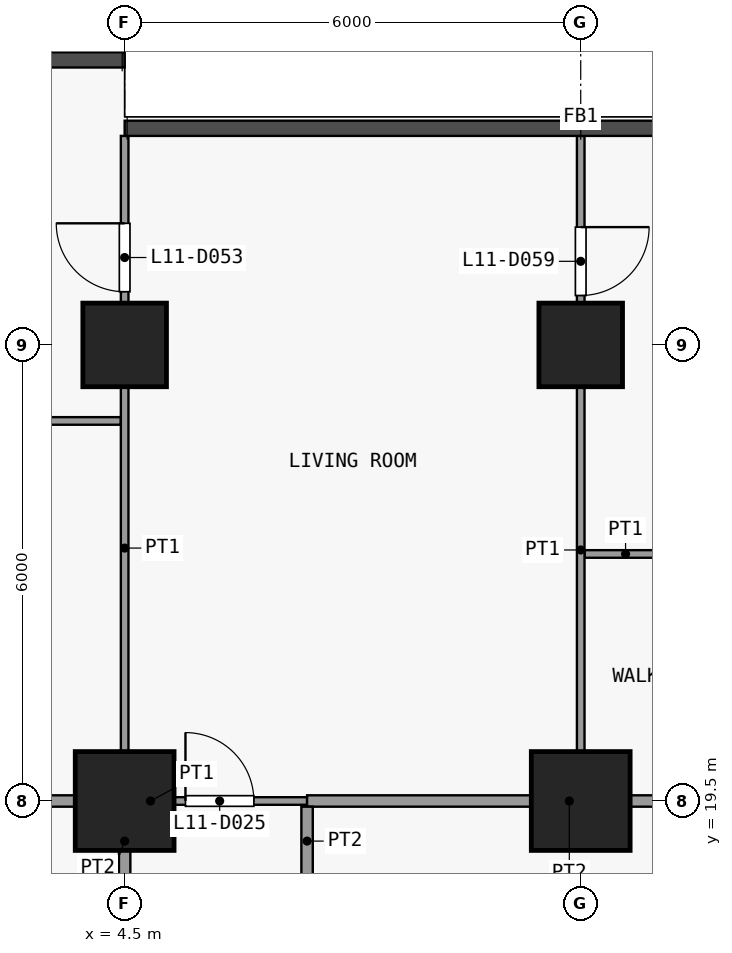
"""IFC4 building model, lengths in metres.
Left out: names, types, materials, properties, quantities, classifications, styles, units other than length and angle.
Written with IfcOpenShell. Run it as: python <this file> out.ifc"""

import sys

from ifc_helpers import new_model, si_unit, direction, frame, frame_2d, origin, origin_2d, place, context, subcontext, project, spatial, rectangle, extrude, element, fill, save


model = new_model("IFC4")
c1 = context("Model", 3, precision=1e-05, world=origin(), true_north=direction((0.0, 1.0)))
c2 = subcontext(c1, "Body", "Model", "MODEL_VIEW")
j1 = project(units=[si_unit("LENGTHUNIT", "METRE"), si_unit("PLANEANGLEUNIT", "RADIAN")], contexts=[c1])
p1 = place(None, origin())
s1 = spatial("IfcSite", under=j1, at=p1, CompositionType="ELEMENT")
p2 = place(p1, origin())
s2 = spatial("IfcBuilding", under=s1, at=p2, CompositionType="ELEMENT")
p3 = place(p2, frame((0.0, 0.0, 50.5)))
s3 = spatial("IfcBuildingStorey", under=s2, at=p3, CompositionType="ELEMENT", Elevation=50.5)
p4 = place(p3, frame((4.5, 19.5, 0.0), z_axis=(0.0, 0.0, 1.0), x_axis=(1.0, 0.0, 0.0)))
e1 = element("IfcColumn", 1, at=p4, inside=s3, PredefinedType="COLUMN", context=c2, shape_type="SweptSolid", body=[
    extrude(rectangle(XDim=1.3, YDim=1.3, at=origin_2d()), origin(), (0.0, 0.0, 1.0), 3.6),
])
p5 = place(p3, frame((4.5, 25.5, 0.0), z_axis=(0.0, 0.0, 1.0), x_axis=(1.0, 0.0, 0.0)))
e2 = element("IfcColumn", 2, at=p5, inside=s3, PredefinedType="COLUMN", context=c2, shape_type="SweptSolid", body=[
    extrude(rectangle(XDim=1.1, YDim=1.1, at=origin_2d()), origin(), (0.0, 0.0, 1.0), 3.6),
])
p6 = place(p3, frame((10.5, 19.5, 0.0), z_axis=(0.0, 0.0, 1.0), x_axis=(1.0, 0.0, 0.0)))
e3 = element("IfcColumn", 3, at=p6, inside=s3, PredefinedType="COLUMN", context=c2, shape_type="SweptSolid", body=[
    extrude(rectangle(XDim=1.3, YDim=1.3, at=origin_2d()), origin(), (0.0, 0.0, 1.0), 3.6),
])
p7 = place(p3, frame((10.5, 25.5, 0.0), z_axis=(0.0, 0.0, 1.0), x_axis=(1.0, 0.0, 0.0)))
e4 = element("IfcColumn", 4, at=p7, inside=s3, PredefinedType="COLUMN", context=c2, shape_type="SweptSolid", body=[
    extrude(rectangle(XDim=1.1, YDim=1.1, at=origin_2d()), origin(), (0.0, 0.0, 1.0), 3.6),
])
p8 = place(p3, frame((4.5, 19.5, 0.0), z_axis=(0.0, 0.0, 1.0), x_axis=(1.0, 0.0, 0.0)))
e5 = element("IfcWall", 5, at=p8, inside=s3, PredefinedType="PARTITIONING", context=c2, shape_type="SweptSolid", body=[
    extrude(rectangle(XDim=2.4, YDim=0.1, at=frame_2d((1.2, 0.0))), origin(), (0.0, 0.0, 1.0), 3.3),
])
p9 = place(p8, frame((0.8, 0.0, 0.0)))
e6 = element("IfcOpeningElement", 6, at=p9, cuts=e5, PredefinedType="OPENING", context=c2, shape_type="SweptSolid", body=[
    extrude(rectangle(XDim=0.9, YDim=2.1, at=frame_2d((0.45, 1.05))), frame((0.0, 0.06, 0.0), z_axis=(0.0, -1.0, 0.0), x_axis=(1.0, 0.0, 0.0)), (0.0, 0.0, 1.0), 0.12),
])
p10 = place(p3, frame((-2.75, 19.5, 0.0), z_axis=(0.0, 0.0, 1.0), x_axis=(1.0, 0.0, 0.0)))
e7 = element("IfcWall", 7, at=p10, inside=s3, PredefinedType="PARTITIONING", context=c2, shape_type="SweptSolid", body=[
    extrude(rectangle(XDim=7.25, YDim=0.15, at=frame_2d((3.625, 0.0))), origin(), (0.0, 0.0, 1.0), 3.3),
])
p11 = place(p3, frame((6.9, 19.5, 0.0), z_axis=(0.0, 0.0, 1.0), x_axis=(1.0, 0.0, 0.0)))
e8 = element("IfcWall", 8, at=p11, inside=s3, PredefinedType="PARTITIONING", context=c2, shape_type="SweptSolid", body=[
    extrude(rectangle(XDim=6.9, YDim=0.15, at=frame_2d((3.45, 0.0))), origin(), (0.0, 0.0, 1.0), 3.3),
])
p12 = place(p3, frame((10.55, 22.75, 0.0), z_axis=(0.0, 0.0, 1.0), x_axis=(1.0, 0.0, 0.0)))
e9 = element("IfcWall", 9, at=p12, inside=s3, PredefinedType="PARTITIONING", context=c2, shape_type="SweptSolid", body=[
    extrude(rectangle(XDim=3.25, YDim=0.1, at=frame_2d((1.625, 0.0))), origin(), (0.0, 0.0, 1.0), 3.3),
])
p13 = place(p12, frame((1.2, 0.0, 0.0)))
e10 = element("IfcOpeningElement", 10, at=p13, cuts=e9, PredefinedType="OPENING", context=c2, shape_type="SweptSolid", body=[
    extrude(rectangle(XDim=0.9, YDim=2.1, at=frame_2d((0.45, 1.05))), frame((0.0, 0.06, 0.0), z_axis=(0.0, -1.0, 0.0), x_axis=(1.0, 0.0, 0.0)), (0.0, 0.0, 1.0), 0.12),
])
p14 = place(p3, frame((-4.4, 24.5, 0.0), z_axis=(0.0, 0.0, 1.0), x_axis=(1.0, 0.0, 0.0)))
e11 = element("IfcWall", 11, at=p14, inside=s3, PredefinedType="PARTITIONING", context=c2, shape_type="SweptSolid", body=[
    extrude(rectangle(XDim=8.85, YDim=0.1, at=frame_2d((4.425, 0.0))), origin(), (0.0, 0.0, 1.0), 3.3),
])
p15 = place(p14, frame((4.0, 0.0, 0.0)))
e12 = element("IfcOpeningElement", 12, at=p15, cuts=e11, PredefinedType="OPENING", context=c2, shape_type="SweptSolid", body=[
    extrude(rectangle(XDim=0.9, YDim=2.1, at=frame_2d((0.45, 1.05))), frame((0.0, 0.06, 0.0), z_axis=(0.0, -1.0, 0.0), x_axis=(1.0, 0.0, 0.0)), (0.0, 0.0, 1.0), 0.12),
])
p16 = place(p3, frame((4.5, 19.575, 0.0), z_axis=(0.0, 0.0, 1.0), x_axis=(0.0, 1.0, 0.0)))
e13 = element("IfcWall", 13, at=p16, inside=s3, PredefinedType="PARTITIONING", context=c2, shape_type="SweptSolid", body=[
    extrude(rectangle(XDim=8.675, YDim=0.1, at=frame_2d((4.337, 0.0))), origin(), (0.0, 0.0, 1.0), 3.3),
])
p17 = place(p16, frame((6.625, 0.0, 0.0)))
e14 = element("IfcOpeningElement", 14, at=p17, cuts=e13, PredefinedType="OPENING", context=c2, shape_type="SweptSolid", body=[
    extrude(rectangle(XDim=0.9, YDim=2.1, at=frame_2d((0.45, 1.05))), frame((0.0, 0.06, 0.0), z_axis=(0.0, -1.0, 0.0), x_axis=(1.0, 0.0, 0.0)), (0.0, 0.0, 1.0), 0.12),
])
p18 = place(p3, frame((4.5, 16.6, 0.0), z_axis=(0.0, 0.0, 1.0), x_axis=(0.0, 1.0, 0.0)))
e15 = element("IfcWall", 15, at=p18, inside=s3, PredefinedType="PARTITIONING", context=c2, shape_type="SweptSolid", body=[
    extrude(rectangle(XDim=2.825, YDim=0.15, at=frame_2d((1.413, 0.0))), origin(), (0.0, 0.0, 1.0), 3.3),
])
p19 = place(p18, frame((0.9, 0.0, 0.0)))
e16 = element("IfcOpeningElement", 16, at=p19, cuts=e15, PredefinedType="OPENING", context=c2, shape_type="SweptSolid", body=[
    extrude(rectangle(XDim=0.9, YDim=2.1, at=frame_2d((0.45, 1.05))), frame((0.0, 0.085, 0.0), z_axis=(0.0, -1.0, 0.0), x_axis=(1.0, 0.0, 0.0)), (0.0, 0.0, 1.0), 0.17),
])
p20 = place(p3, frame((6.9, 16.6, 0.0), z_axis=(0.0, 0.0, 1.0), x_axis=(0.0, 1.0, 0.0)))
e17 = element("IfcWall", 17, at=p20, inside=s3, PredefinedType="PARTITIONING", context=c2, shape_type="SweptSolid", body=[
    extrude(rectangle(XDim=2.825, YDim=0.15, at=frame_2d((1.413, 0.0))), origin(), (0.0, 0.0, 1.0), 3.3),
])
p21 = place(p20, frame((0.9, 0.0, 0.0)))
e18 = element("IfcOpeningElement", 18, at=p21, cuts=e17, PredefinedType="OPENING", context=c2, shape_type="SweptSolid", body=[
    extrude(rectangle(XDim=0.9, YDim=2.1, at=frame_2d((0.45, 1.05))), frame((0.0, 0.085, 0.0), z_axis=(0.0, -1.0, 0.0), x_axis=(1.0, 0.0, 0.0)), (0.0, 0.0, 1.0), 0.17),
])
p22 = place(p3, frame((10.5, 19.575, 0.0), z_axis=(0.0, 0.0, 1.0), x_axis=(0.0, 1.0, 0.0)))
e19 = element("IfcWall", 19, at=p22, inside=s3, PredefinedType="PARTITIONING", context=c2, shape_type="SweptSolid", body=[
    extrude(rectangle(XDim=8.675, YDim=0.1, at=frame_2d((4.337, 0.0))), origin(), (0.0, 0.0, 1.0), 3.3),
])
p23 = place(p22, frame((6.575, 0.0, 0.0)))
e20 = element("IfcOpeningElement", 20, at=p23, cuts=e19, PredefinedType="OPENING", context=c2, shape_type="SweptSolid", body=[
    extrude(rectangle(XDim=0.9, YDim=2.1, at=frame_2d((0.45, 1.05))), frame((0.0, 0.06, 0.0), z_axis=(0.0, -1.0, 0.0), x_axis=(1.0, 0.0, 0.0)), (0.0, 0.0, 1.0), 0.12),
])
p24 = place(p9, origin())
e21 = element("IfcDoor", 21, at=p24, inside=s3, OperationType="SINGLE_SWING_RIGHT", PredefinedType="DOOR", context=c2, shape_type="SweptSolid", body=[
    extrude(rectangle(XDim=0.9, YDim=2.1, at=frame_2d((0.45, 1.05))), frame((0.0, 0.025, 0.0), z_axis=(0.0, -1.0, 0.0), x_axis=(1.0, 0.0, 0.0)), (0.0, 0.0, 1.0), 0.05),
])
fill(e6, e21)
p25 = place(p17, origin())
e22 = element("IfcDoor", 22, at=p25, inside=s3, OperationType="SINGLE_SWING_LEFT", PredefinedType="DOOR", context=c2, shape_type="SweptSolid", body=[
    extrude(rectangle(XDim=0.9, YDim=2.1, at=frame_2d((0.45, 1.05))), frame((0.0, 0.025, 0.0), z_axis=(0.0, -1.0, 0.0), x_axis=(1.0, 0.0, 0.0)), (0.0, 0.0, 1.0), 0.05),
])
fill(e14, e22)
p26 = place(p23, origin())
e23 = element("IfcDoor", 23, at=p26, inside=s3, OperationType="SINGLE_SWING_RIGHT", PredefinedType="DOOR", context=c2, shape_type="SweptSolid", body=[
    extrude(rectangle(XDim=0.9, YDim=2.1, at=frame_2d((0.45, 1.05))), frame((0.0, 0.025, 0.0), z_axis=(0.0, -1.0, 0.0), x_axis=(1.0, 0.0, 0.0)), (0.0, 0.0, 1.0), 0.05),
])
fill(e20, e23)
save(model, sys.argv[1])
